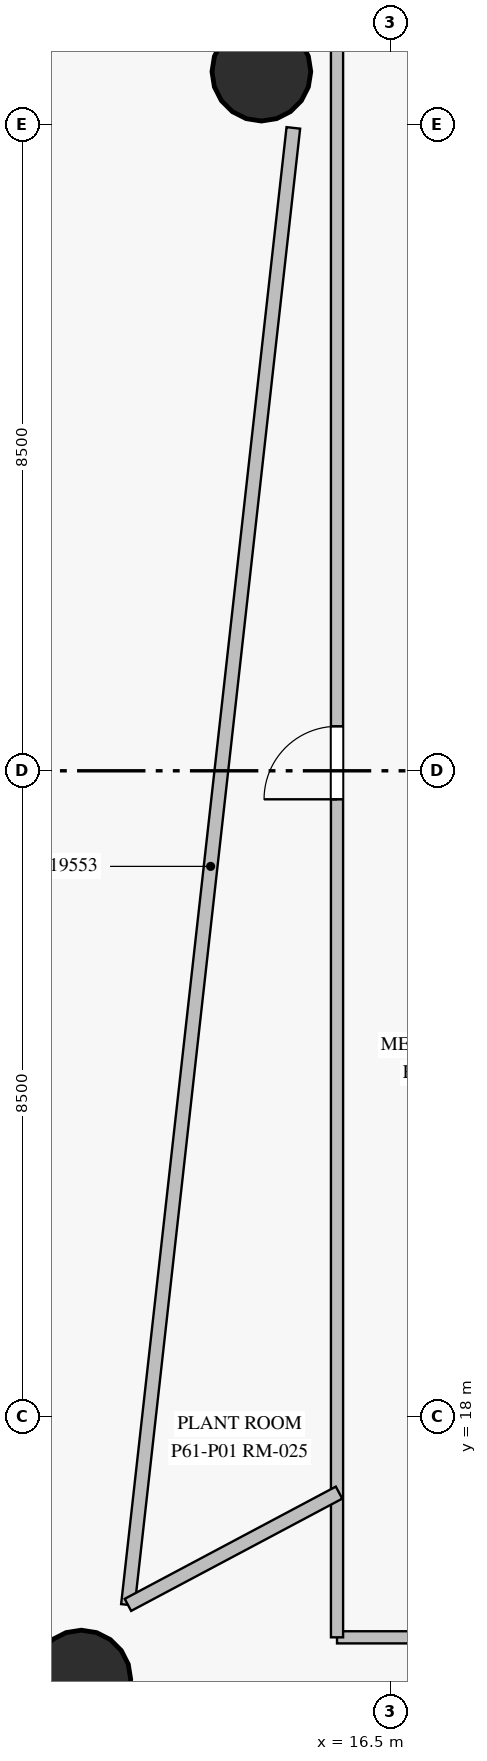
"""IFC4 building model, lengths in metres.
Left out: names, types, materials, properties, quantities, classifications, styles, units other than length and angle.
Written with IfcOpenShell. Run it as: python <this file> out.ifc"""

import sys

from ifc_helpers import new_model, si_unit, direction, frame, frame_2d, origin, origin_with_axes, origin_2d, place, context, subcontext, project, spatial, rectangle, circle, extrude, source, transform, mapped, element, fill, save


model = new_model("IFC4")
c1 = context("Model", 3, precision=1e-05, world=origin(), true_north=direction((0.0, 1.0)))
c2 = subcontext(c1, "Body", "Model", "MODEL_VIEW")
j1 = project(units=[si_unit("LENGTHUNIT", "METRE"), si_unit("PLANEANGLEUNIT", "RADIAN")], contexts=[c1])
p1 = place(None, origin())
s1 = spatial("IfcSite", under=j1, at=p1, CompositionType="ELEMENT")
p2 = place(p1, origin())
s2 = spatial("IfcBuilding", under=s1, at=p2, CompositionType="ELEMENT")
p3 = place(p2, frame((0.0, 0.0, 208.4)))
s3 = spatial("IfcBuildingStorey", under=s2, at=p3, CompositionType="ELEMENT", Elevation=208.4)
m1 = source(origin_with_axes(), c2, "Body", "SweptSolid", [
    extrude(circle(Radius=0.65, at=origin_2d()), origin(), (0.0, 0.0, 1.0), 4.5),
])
for number, where, z_axis, x_axis in (
    (1, (14.805, 35.698, 0.0), (0.0, 0.0, 1.0), (1.0, 0.0, 0.0)),
    (2, (12.436, 14.544, 0.0), (0.0, 0.0, 1.0), (1.0, 0.0, 0.0)),
):
    element("IfcColumn", number, at=place(p3, frame(where, z_axis=z_axis, x_axis=x_axis)), inside=s3, PredefinedType="COLUMN", context=c2, shape_type="MappedRepresentation", body=[
        mapped(m1, transform((0.0, 0.0, 0.0), scale=1.0)),
    ])
p4 = place(p3, frame((7.677, 18.0, 0.0), z_axis=(0.0, 0.0, 1.0), x_axis=(0.674632867411, -0.738153435411, 0.0)))
e3 = element("IfcWall", 3, at=p4, inside=s3, PredefinedType="SOLIDWALL", context=c2, shape_type="SweptSolid", body=[
    extrude(rectangle(XDim=13.406, YDim=0.28, at=frame_2d((6.703, 0.0))), origin(), (0.0, 0.0, 1.0), 3.97),
])
p5 = place(p3, frame((40.25, 15.1, 0.0), z_axis=(0.0, 0.0, 1.0), x_axis=(-1.0, 0.0, 0.0)))
e4 = element("IfcWall", 4, at=p5, inside=s3, PredefinedType="PARTITIONING", context=c2, shape_type="SweptSolid", body=[
    extrude(rectangle(XDim=24.45, YDim=0.16, at=frame_2d((12.225, 0.0))), origin(), (0.0, 0.0, 1.0), 3.0),
])
p6 = place(p5, frame((15.417, 0.0, 0.0)))
e5 = element("IfcOpeningElement", 5, at=p6, cuts=e4, PredefinedType="OPENING", context=c2, shape_type="SweptSolid", body=[
    extrude(rectangle(XDim=0.96, YDim=2.15, at=frame_2d((0.48, 1.075))), frame((0.0, 0.09, 0.0), z_axis=(0.0, -1.0, 0.0), x_axis=(1.0, 0.0, 0.0)), (0.0, 0.0, 1.0), 0.18),
])
p7 = place(p5, frame((11.61, 0.0, 0.0)))
e6 = element("IfcOpeningElement", 6, at=p7, cuts=e4, PredefinedType="OPENING", context=c2, shape_type="SweptSolid", body=[
    extrude(rectangle(XDim=0.96, YDim=2.15, at=frame_2d((0.48, 1.075))), frame((0.0, 0.09, 0.0), z_axis=(0.0, -1.0, 0.0), x_axis=(1.0, 0.0, 0.0)), (0.0, 0.0, 1.0), 0.18),
])
p8 = place(p5, frame((17.863, 0.0, 0.0)))
e7 = element("IfcOpeningElement", 7, at=p8, cuts=e4, PredefinedType="OPENING", context=c2, shape_type="SweptSolid", body=[
    extrude(rectangle(XDim=0.96, YDim=2.15, at=frame_2d((0.48, 1.075))), frame((0.0, 0.09, 0.0), z_axis=(0.0, -1.0, 0.0), x_axis=(1.0, 0.0, 0.0)), (0.0, 0.0, 1.0), 0.18),
])
p9 = place(p5, frame((7.692, 0.0, 0.0)))
e8 = element("IfcOpeningElement", 8, at=p9, cuts=e4, PredefinedType="OPENING", context=c2, shape_type="SweptSolid", body=[
    extrude(rectangle(XDim=0.96, YDim=2.15, at=frame_2d((0.48, 1.075))), frame((0.0, 0.09, 0.0), z_axis=(0.0, -1.0, 0.0), x_axis=(1.0, 0.0, 0.0)), (0.0, 0.0, 1.0), 0.18),
])
p10 = place(p3, frame((15.8, 15.1, 0.0), z_axis=(0.0, 0.0, 1.0), x_axis=(0.0, 1.0, 0.0)))
e9 = element("IfcWall", 9, at=p10, inside=s3, PredefinedType="PARTITIONING", context=c2, shape_type="SweptSolid", body=[
    extrude(rectangle(XDim=23.0, YDim=0.16, at=frame_2d((11.5, 0.0))), origin(), (0.0, 0.0, 1.0), 3.0),
])
p11 = place(p10, frame((11.025, 0.0, 0.0)))
e10 = element("IfcOpeningElement", 10, at=p11, cuts=e9, PredefinedType="OPENING", context=c2, shape_type="SweptSolid", body=[
    extrude(rectangle(XDim=0.96, YDim=2.15, at=frame_2d((0.48, 1.075))), frame((0.0, 0.09, 0.0), z_axis=(0.0, -1.0, 0.0), x_axis=(1.0, 0.0, 0.0)), (0.0, 0.0, 1.0), 0.18),
])
p12 = place(p3, frame((13.049, 15.527, 0.0), z_axis=(0.0, 0.0, 1.0), x_axis=(0.111290758252, 0.993787888399, 0.0)))
e11 = element("IfcWall", 11, at=p12, inside=s3, PredefinedType="PARTITIONING", context=c2, shape_type="SweptSolid", body=[
    extrude(rectangle(XDim=19.553, YDim=0.18, at=frame_2d((9.776, 0.0))), origin(), (0.0, 0.0, 1.0), 3.4),
])
p13 = place(p3, frame((15.826, 17.004, 0.0), z_axis=(0.0, 0.0, 1.0), x_axis=(-0.882921683939, -0.469520287134, 0.0)))
e12 = element("IfcWall", 12, at=p13, inside=s3, PredefinedType="PARTITIONING", context=c2, shape_type="SweptSolid", body=[
    extrude(rectangle(XDim=3.145, YDim=0.18, at=frame_2d((1.573, 0.0))), origin(), (0.0, 0.0, 1.0), 2.8),
])
m2 = source(origin_with_axes(), c2, "Body", "SweptSolid", [
    extrude(rectangle(XDim=0.96, YDim=2.15, at=frame_2d((0.48, 1.075))), frame((0.0, 0.025, 0.0), z_axis=(0.0, -1.0, 0.0), x_axis=(1.0, 0.0, 0.0)), (0.0, 0.0, 1.0), 0.05),
])
p14 = place(p11, origin())
e13 = element("IfcDoor", 13, at=p14, inside=s3, OperationType="SINGLE_SWING_LEFT", PredefinedType="DOOR", context=c2, shape_type="MappedRepresentation", body=[
    mapped(m2, transform((0.0, 0.0, 0.0), scale=1.0)),
])
fill(e10, e13)
save(model, sys.argv[1])
